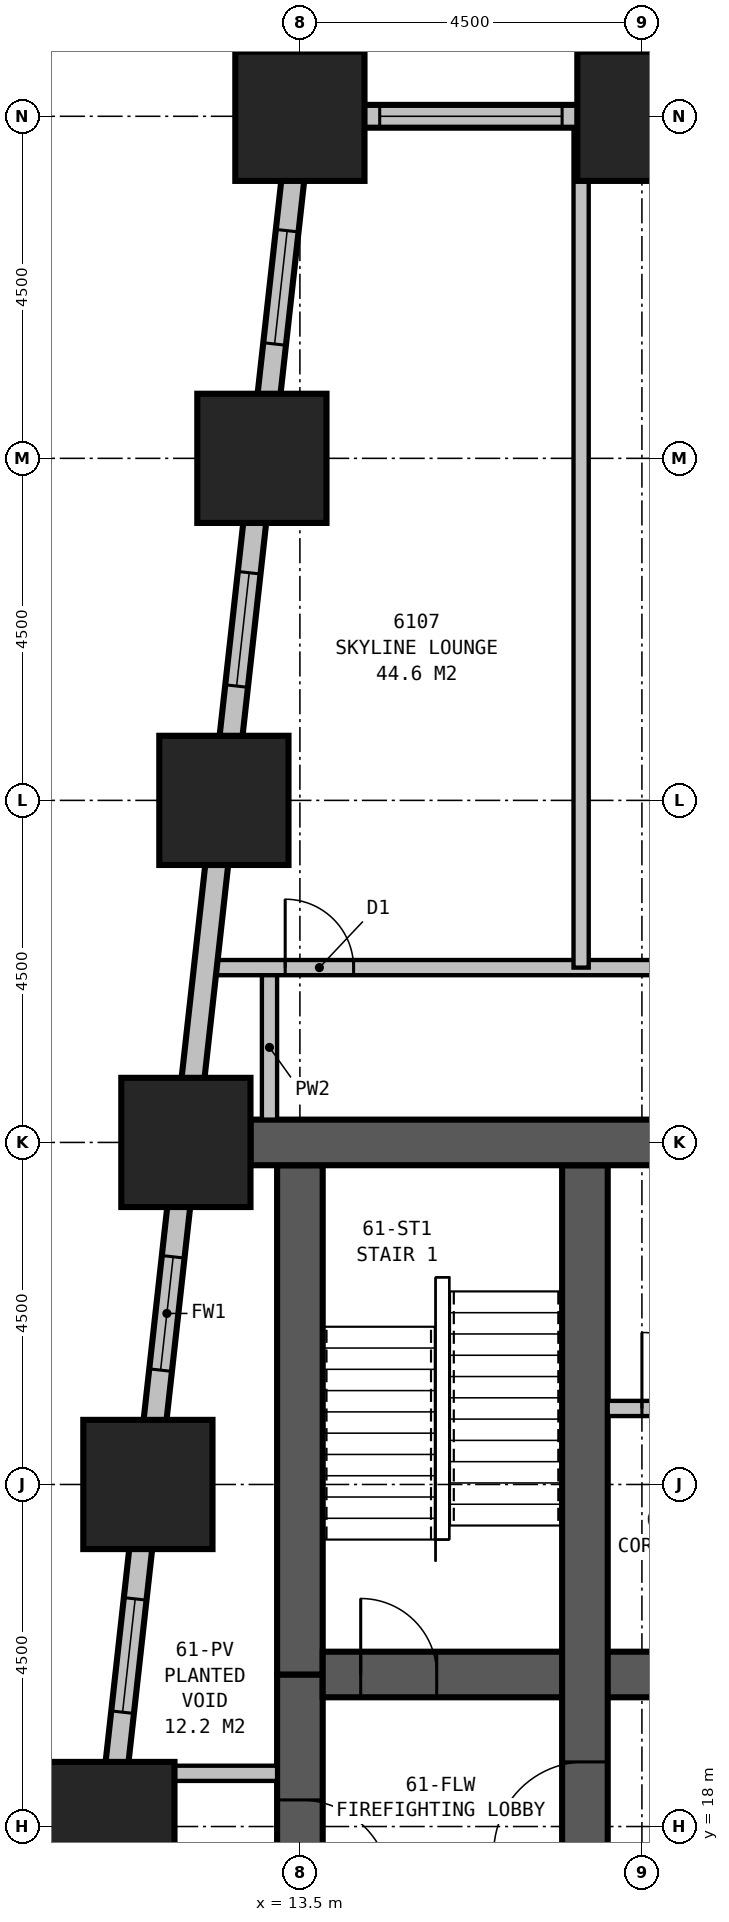
"""IFC4 building model, lengths in metres.
Left out: names, types, materials, properties, quantities, classifications, styles, units other than length and angle.
Written with IfcOpenShell. Run it as: python <this file> out.ifc"""

import sys

from ifc_helpers import new_model, si_unit, direction, frame, frame_2d, origin, origin_2d, place, context, subcontext, project, spatial, rectangle, extrude, element, fill, save


model = new_model("IFC4")
c1 = context("Model", 3, precision=1e-05, world=origin(), true_north=direction((0.0, 1.0)))
c2 = subcontext(c1, "Body", "Model", "MODEL_VIEW")
j1 = project(units=[si_unit("LENGTHUNIT", "METRE"), si_unit("PLANEANGLEUNIT", "RADIAN")], contexts=[c1])
p1 = place(None, origin())
s1 = spatial("IfcSite", under=j1, at=p1, CompositionType="ELEMENT")
p2 = place(p1, origin())
s2 = spatial("IfcBuilding", under=s1, at=p2, CompositionType="ELEMENT")
p3 = place(p2, frame((0.0, 0.0, 236.9)))
s3 = spatial("IfcBuildingStorey", under=s2, at=p3, CompositionType="ELEMENT", Elevation=236.9)
for number, where, z_axis, x_axis in (
    (1, (18.0, 40.5, 0.0), (0.0, 0.0, 1.0), (1.0, 0.0, 0.0)),
    (2, (13.5, 40.5, 0.0), (0.0, 0.0, 1.0), (1.0, 0.0, 0.0)),
    (3, (13.0, 36.0, 0.0), (0.0, 0.0, 1.0), (1.0, 0.0, 0.0)),
    (4, (12.5, 31.5, 0.0), (0.0, 0.0, 1.0), (1.0, 0.0, 0.0)),
    (5, (12.0, 27.0, 0.0), (0.0, 0.0, 1.0), (1.0, 0.0, 0.0)),
    (6, (11.5, 22.5, 0.0), (0.0, 0.0, 1.0), (1.0, 0.0, 0.0)),
    (7, (11.0, 18.0, 0.0), (0.0, 0.0, 1.0), (1.0, 0.0, 0.0)),
):
    element("IfcColumn", number, at=place(p3, frame(where, z_axis=z_axis, x_axis=x_axis)), inside=s3, PredefinedType="COLUMN", context=c2, shape_type="SweptSolid", body=[
        extrude(rectangle(XDim=1.7, YDim=1.7, at=origin_2d()), origin(), (0.0, 0.0, 1.0), 3.9),
    ])
p4 = place(p3, frame((36.3, 27.0, 0.0), z_axis=(0.0, 0.0, 1.0), x_axis=(-1.0, 0.0, 0.0)))
e8 = element("IfcWall", 8, at=p4, inside=s3, PredefinedType="SHEAR", context=c2, shape_type="SweptSolid", body=[
    extrude(rectangle(XDim=23.45, YDim=0.6, at=frame_2d((11.725, 0.0))), origin(), (0.0, 0.0, 1.0), 3.9),
])
p5 = place(p4, frame((17.05, 0.0, 0.0)))
e9 = element("IfcOpeningElement", 9, at=p5, cuts=e8, PredefinedType="OPENING", context=c2, shape_type="SweptSolid", body=[
    extrude(rectangle(XDim=1.0, YDim=2.1, at=frame_2d((0.5, 1.05))), frame((0.0, 0.31, 0.0), z_axis=(0.0, -1.0, 0.0), x_axis=(1.0, 0.0, 0.0)), (0.0, 0.0, 1.0), 0.62),
])
p6 = place(p4, frame((12.05, 0.0, 0.0)))
e10 = element("IfcOpeningElement", 10, at=p6, cuts=e8, PredefinedType="OPENING", context=c2, shape_type="SweptSolid", body=[
    extrude(rectangle(XDim=1.0, YDim=2.1, at=frame_2d((0.5, 1.05))), frame((0.0, 0.31, 0.0), z_axis=(0.0, -1.0, 0.0), x_axis=(1.0, 0.0, 0.0)), (0.0, 0.0, 1.0), 0.62),
])
p7 = place(p4, frame((7.05, 0.0, 0.0)))
e11 = element("IfcOpeningElement", 11, at=p7, cuts=e8, PredefinedType="OPENING", context=c2, shape_type="SweptSolid", body=[
    extrude(rectangle(XDim=1.0, YDim=2.1, at=frame_2d((0.5, 1.05))), frame((0.0, 0.31, 0.0), z_axis=(0.0, -1.0, 0.0), x_axis=(1.0, 0.0, 0.0)), (0.0, 0.0, 1.0), 0.62),
])
p8 = place(p3, frame((17.25, 13.8, 0.0), z_axis=(0.0, 0.0, 1.0), x_axis=(0.0, 1.0, 0.0)))
e12 = element("IfcWall", 12, at=p8, inside=s3, PredefinedType="SHEAR", context=c2, shape_type="SweptSolid", body=[
    extrude(rectangle(XDim=12.9, YDim=0.6, at=frame_2d((6.45, 0.0))), origin(), (0.0, 0.0, 1.0), 3.9),
])
p9 = place(p8, frame((3.85, 0.0, 0.0)))
e13 = element("IfcOpeningElement", 13, at=p9, cuts=e12, PredefinedType="OPENING", context=c2, shape_type="SweptSolid", body=[
    extrude(rectangle(XDim=1.2, YDim=2.1, at=frame_2d((0.6, 1.05))), frame((0.0, 0.31, 0.0), z_axis=(0.0, -1.0, 0.0), x_axis=(1.0, 0.0, 0.0)), (0.0, 0.0, 1.0), 0.62),
])
p10 = place(p3, frame((13.8, 20.0, 0.0), z_axis=(0.0, 0.0, 1.0), x_axis=(1.0, 0.0, 0.0)))
e14 = element("IfcWall", 14, at=p10, inside=s3, PredefinedType="SHEAR", context=c2, shape_type="SweptSolid", body=[
    extrude(rectangle(XDim=21.9, YDim=0.6, at=frame_2d((10.95, 0.0))), origin(), (0.0, 0.0, 1.0), 3.9),
])
p11 = place(p10, frame((0.5, 0.0, 0.0)))
e15 = element("IfcOpeningElement", 15, at=p11, cuts=e14, PredefinedType="OPENING", context=c2, shape_type="SweptSolid", body=[
    extrude(rectangle(XDim=1.0, YDim=2.1, at=frame_2d((0.5, 1.05))), frame((0.0, 0.31, 0.0), z_axis=(0.0, -1.0, 0.0), x_axis=(1.0, 0.0, 0.0)), (0.0, 0.0, 1.0), 0.62),
])
p12 = place(p10, frame((20.5, 0.0, 0.0)))
e16 = element("IfcOpeningElement", 16, at=p12, cuts=e14, PredefinedType="OPENING", context=c2, shape_type="SweptSolid", body=[
    extrude(rectangle(XDim=1.0, YDim=2.1, at=frame_2d((0.5, 1.05))), frame((0.0, 0.31, 0.0), z_axis=(0.0, -1.0, 0.0), x_axis=(1.0, 0.0, 0.0)), (0.0, 0.0, 1.0), 0.62),
])
p13 = place(p10, frame((9.15, 0.0, 0.0)))
e17 = element("IfcOpeningElement", 17, at=p13, cuts=e14, PredefinedType="OPENING", context=c2, shape_type="SweptSolid", body=[
    extrude(rectangle(XDim=1.1, YDim=2.1, at=frame_2d((0.55, 1.05))), frame((0.0, 0.31, 0.0), z_axis=(0.0, -1.0, 0.0), x_axis=(1.0, 0.0, 0.0)), (0.0, 0.0, 1.0), 0.62),
])
p14 = place(p10, frame((11.65, 0.0, 0.0)))
e18 = element("IfcOpeningElement", 18, at=p14, cuts=e14, PredefinedType="OPENING", context=c2, shape_type="SweptSolid", body=[
    extrude(rectangle(XDim=1.1, YDim=2.1, at=frame_2d((0.55, 1.05))), frame((0.0, 0.31, 0.0), z_axis=(0.0, -1.0, 0.0), x_axis=(1.0, 0.0, 0.0)), (0.0, 0.0, 1.0), 0.62),
])
p15 = place(p10, frame((14.15, 0.0, 0.0)))
e19 = element("IfcOpeningElement", 19, at=p15, cuts=e14, PredefinedType="OPENING", context=c2, shape_type="SweptSolid", body=[
    extrude(rectangle(XDim=1.1, YDim=2.1, at=frame_2d((0.55, 1.05))), frame((0.0, 0.31, 0.0), z_axis=(0.0, -1.0, 0.0), x_axis=(1.0, 0.0, 0.0)), (0.0, 0.0, 1.0), 0.62),
])
p16 = place(p10, frame((16.65, 0.0, 0.0)))
e20 = element("IfcOpeningElement", 20, at=p16, cuts=e14, PredefinedType="OPENING", context=c2, shape_type="SweptSolid", body=[
    extrude(rectangle(XDim=1.1, YDim=2.1, at=frame_2d((0.55, 1.05))), frame((0.0, 0.31, 0.0), z_axis=(0.0, -1.0, 0.0), x_axis=(1.0, 0.0, 0.0)), (0.0, 0.0, 1.0), 0.62),
])
p17 = place(p10, frame((5.75, 0.0, 0.0), z_axis=(0.0, 0.0, 1.0), x_axis=(-1.0, 0.0, 0.0)))
e21 = element("IfcOpeningElement", 21, at=p17, cuts=e14, PredefinedType="OPENING", context=c2, shape_type="SweptSolid", body=[
    extrude(rectangle(XDim=1.0, YDim=2.1, at=frame_2d((0.5, 1.05))), frame((0.0, 0.31, 0.0), z_axis=(0.0, -1.0, 0.0), x_axis=(1.0, 0.0, 0.0)), (0.0, 0.0, 1.0), 0.62),
])
p18 = place(p10, frame((6.7, 0.0, 0.0)))
e22 = element("IfcOpeningElement", 22, at=p18, cuts=e14, PredefinedType="OPENING", context=c2, shape_type="SweptSolid", body=[
    extrude(rectangle(XDim=1.0, YDim=2.1, at=frame_2d((0.5, 1.05))), frame((0.0, 0.31, 0.0), z_axis=(0.0, -1.0, 0.0), x_axis=(1.0, 0.0, 0.0)), (0.0, 0.0, 1.0), 0.62),
])
p19 = place(p3, frame((13.5, 26.7, 0.0), z_axis=(0.0, 0.0, 1.0), x_axis=(0.0, -1.0, 0.0)))
e23 = element("IfcWall", 23, at=p19, inside=s3, PredefinedType="SHEAR", context=c2, shape_type="SweptSolid", body=[
    extrude(rectangle(XDim=6.7, YDim=0.6, at=frame_2d((3.35, 0.0))), origin(), (0.0, 0.0, 1.0), 3.9),
])
p20 = place(p3, frame((13.5, 20.0, 0.0), z_axis=(0.0, 0.0, 1.0), x_axis=(0.0, -1.0, 0.0)))
e24 = element("IfcWall", 24, at=p20, inside=s3, PredefinedType="SHEAR", context=c2, shape_type="SweptSolid", body=[
    extrude(rectangle(XDim=3.5, YDim=0.6, at=frame_2d((1.75, 0.0))), origin(), (0.0, 0.0, 1.0), 3.9),
])
p21 = place(p20, frame((1.65, 0.0, 0.0)))
e25 = element("IfcOpeningElement", 25, at=p21, cuts=e24, PredefinedType="OPENING", context=c2, shape_type="SweptSolid", body=[
    extrude(rectangle(XDim=1.2, YDim=2.1, at=frame_2d((0.6, 1.05))), frame((0.0, 0.31, 0.0), z_axis=(0.0, -1.0, 0.0), x_axis=(1.0, 0.0, 0.0)), (0.0, 0.0, 1.0), 0.62),
])
p22 = place(p3, frame((40.65, 40.5, 0.0), z_axis=(0.0, 0.0, 1.0), x_axis=(-1.0, 0.0, 0.0)))
e26 = element("IfcWall", 26, at=p22, inside=s3, PredefinedType="STANDARD", context=c2, shape_type="SweptSolid", body=[
    extrude(rectangle(XDim=27.3, YDim=0.3, at=frame_2d((13.65, 0.0))), origin(), (0.0, 0.0, 1.0), 2.5),
])
p23 = place(p22, frame((1.2, 0.0, 0.5)))
e27 = element("IfcOpeningElement", 27, at=p23, cuts=e26, PredefinedType="OPENING", context=c2, shape_type="SweptSolid", body=[
    extrude(rectangle(XDim=2.4, YDim=1.85, at=frame_2d((1.2, 0.925))), frame((0.0, 0.16, 0.0), z_axis=(0.0, -1.0, 0.0), x_axis=(1.0, 0.0, 0.0)), (0.0, 0.0, 1.0), 0.32),
])
p24 = place(p22, frame((5.7, 0.0, 0.5)))
e28 = element("IfcOpeningElement", 28, at=p24, cuts=e26, PredefinedType="OPENING", context=c2, shape_type="SweptSolid", body=[
    extrude(rectangle(XDim=2.4, YDim=1.85, at=frame_2d((1.2, 0.925))), frame((0.0, 0.16, 0.0), z_axis=(0.0, -1.0, 0.0), x_axis=(1.0, 0.0, 0.0)), (0.0, 0.0, 1.0), 0.32),
])
p25 = place(p22, frame((10.2, 0.0, 0.5)))
e29 = element("IfcOpeningElement", 29, at=p25, cuts=e26, PredefinedType="OPENING", context=c2, shape_type="SweptSolid", body=[
    extrude(rectangle(XDim=2.4, YDim=1.85, at=frame_2d((1.2, 0.925))), frame((0.0, 0.16, 0.0), z_axis=(0.0, -1.0, 0.0), x_axis=(1.0, 0.0, 0.0)), (0.0, 0.0, 1.0), 0.32),
])
p26 = place(p22, frame((14.7, 0.0, 0.5)))
e30 = element("IfcOpeningElement", 30, at=p26, cuts=e26, PredefinedType="OPENING", context=c2, shape_type="SweptSolid", body=[
    extrude(rectangle(XDim=2.4, YDim=1.85, at=frame_2d((1.2, 0.925))), frame((0.0, 0.16, 0.0), z_axis=(0.0, -1.0, 0.0), x_axis=(1.0, 0.0, 0.0)), (0.0, 0.0, 1.0), 0.32),
])
p27 = place(p22, frame((19.2, 0.0, 0.5)))
e31 = element("IfcOpeningElement", 31, at=p27, cuts=e26, PredefinedType="OPENING", context=c2, shape_type="SweptSolid", body=[
    extrude(rectangle(XDim=2.4, YDim=1.85, at=frame_2d((1.2, 0.925))), frame((0.0, 0.16, 0.0), z_axis=(0.0, -1.0, 0.0), x_axis=(1.0, 0.0, 0.0)), (0.0, 0.0, 1.0), 0.32),
])
p28 = place(p22, frame((23.7, 0.0, 0.5)))
e32 = element("IfcOpeningElement", 32, at=p28, cuts=e26, PredefinedType="OPENING", context=c2, shape_type="SweptSolid", body=[
    extrude(rectangle(XDim=2.4, YDim=1.85, at=frame_2d((1.2, 0.925))), frame((0.0, 0.16, 0.0), z_axis=(0.0, -1.0, 0.0), x_axis=(1.0, 0.0, 0.0)), (0.0, 0.0, 1.0), 0.32),
])
p29 = place(p3, frame((13.517, 40.649, 0.0), z_axis=(0.0, 0.0, 1.0), x_axis=(-0.110433201132, -0.993883548555, 0.0)))
e33 = element("IfcWall", 33, at=p29, inside=s3, PredefinedType="STANDARD", context=c2, shape_type="SweptSolid", body=[
    extrude(rectangle(XDim=31.994, YDim=0.3, at=frame_2d((15.997, 0.0))), origin(), (0.0, 0.0, 1.0), 2.5),
])
p30 = place(p29, frame((1.664, 0.0, 0.5)))
e34 = element("IfcOpeningElement", 34, at=p30, cuts=e33, PredefinedType="OPENING", context=c2, shape_type="SweptSolid", body=[
    extrude(rectangle(XDim=1.5, YDim=1.85, at=frame_2d((0.75, 0.925))), frame((0.0, 0.16, 0.0), z_axis=(0.0, -1.0, 0.0), x_axis=(1.0, 0.0, 0.0)), (0.0, 0.0, 1.0), 0.32),
])
p31 = place(p29, frame((6.192, 0.0, 0.5)))
e35 = element("IfcOpeningElement", 35, at=p31, cuts=e33, PredefinedType="OPENING", context=c2, shape_type="SweptSolid", body=[
    extrude(rectangle(XDim=1.5, YDim=1.85, at=frame_2d((0.75, 0.925))), frame((0.0, 0.16, 0.0), z_axis=(0.0, -1.0, 0.0), x_axis=(1.0, 0.0, 0.0)), (0.0, 0.0, 1.0), 0.32),
])
p32 = place(p29, frame((15.247, 0.0, 0.5)))
e36 = element("IfcOpeningElement", 36, at=p32, cuts=e33, PredefinedType="OPENING", context=c2, shape_type="SweptSolid", body=[
    extrude(rectangle(XDim=1.5, YDim=1.85, at=frame_2d((0.75, 0.925))), frame((0.0, 0.16, 0.0), z_axis=(0.0, -1.0, 0.0), x_axis=(1.0, 0.0, 0.0)), (0.0, 0.0, 1.0), 0.32),
])
p33 = place(p29, frame((19.775, 0.0, 0.5)))
e37 = element("IfcOpeningElement", 37, at=p33, cuts=e33, PredefinedType="OPENING", context=c2, shape_type="SweptSolid", body=[
    extrude(rectangle(XDim=1.5, YDim=1.85, at=frame_2d((0.75, 0.925))), frame((0.0, 0.16, 0.0), z_axis=(0.0, -1.0, 0.0), x_axis=(1.0, 0.0, 0.0)), (0.0, 0.0, 1.0), 0.32),
])
p34 = place(p29, frame((24.302, 0.0, 0.5)))
e38 = element("IfcOpeningElement", 38, at=p34, cuts=e33, PredefinedType="OPENING", context=c2, shape_type="SweptSolid", body=[
    extrude(rectangle(XDim=1.5, YDim=1.85, at=frame_2d((0.75, 0.925))), frame((0.0, 0.16, 0.0), z_axis=(0.0, -1.0, 0.0), x_axis=(1.0, 0.0, 0.0)), (0.0, 0.0, 1.0), 0.32),
])
p35 = place(p29, frame((28.83, 0.0, 0.5)))
e39 = element("IfcOpeningElement", 39, at=p35, cuts=e33, PredefinedType="OPENING", context=c2, shape_type="SweptSolid", body=[
    extrude(rectangle(XDim=1.5, YDim=1.85, at=frame_2d((0.75, 0.925))), frame((0.0, 0.16, 0.0), z_axis=(0.0, -1.0, 0.0), x_axis=(1.0, 0.0, 0.0)), (0.0, 0.0, 1.0), 0.32),
])
p36 = place(p3, frame((12.406, 29.3, 0.0), z_axis=(0.0, 0.0, 1.0), x_axis=(1.0, 0.0, 0.0)))
e40 = element("IfcWall", 40, at=p36, inside=s3, PredefinedType="PARTITIONING", context=c2, shape_type="SweptSolid", body=[
    extrude(rectangle(XDim=25.894, YDim=0.2, at=frame_2d((12.947, 0.0))), origin(), (0.0, 0.0, 1.0), 3.65),
])
p37 = place(p36, frame((0.9, 0.0, 0.0)))
e41 = element("IfcOpeningElement", 41, at=p37, cuts=e40, PredefinedType="OPENING", context=c2, shape_type="SweptSolid", body=[
    extrude(rectangle(XDim=0.9, YDim=2.1, at=frame_2d((0.45, 1.05))), frame((0.0, 0.11, 0.0), z_axis=(0.0, -1.0, 0.0), x_axis=(1.0, 0.0, 0.0)), (0.0, 0.0, 1.0), 0.22),
])
p38 = place(p36, frame((6.444, 0.0, 0.0)))
e42 = element("IfcOpeningElement", 42, at=p38, cuts=e40, PredefinedType="OPENING", context=c2, shape_type="SweptSolid", body=[
    extrude(rectangle(XDim=0.9, YDim=2.1, at=frame_2d((0.45, 1.05))), frame((0.0, 0.11, 0.0), z_axis=(0.0, -1.0, 0.0), x_axis=(1.0, 0.0, 0.0)), (0.0, 0.0, 1.0), 0.22),
])
p39 = place(p36, frame((14.644, 0.0, 0.0)))
e43 = element("IfcOpeningElement", 43, at=p39, cuts=e40, PredefinedType="OPENING", context=c2, shape_type="SweptSolid", body=[
    extrude(rectangle(XDim=0.9, YDim=2.1, at=frame_2d((0.45, 1.05))), frame((0.0, 0.11, 0.0), z_axis=(0.0, -1.0, 0.0), x_axis=(1.0, 0.0, 0.0)), (0.0, 0.0, 1.0), 0.22),
])
p40 = place(p36, frame((24.293, 0.0, 0.0)))
e44 = element("IfcOpeningElement", 44, at=p40, cuts=e40, PredefinedType="OPENING", context=c2, shape_type="SweptSolid", body=[
    extrude(rectangle(XDim=0.9, YDim=2.1, at=frame_2d((0.45, 1.05))), frame((0.0, 0.11, 0.0), z_axis=(0.0, -1.0, 0.0), x_axis=(1.0, 0.0, 0.0)), (0.0, 0.0, 1.0), 0.22),
])
p41 = place(p3, frame((13.2, 18.7, 0.0), z_axis=(0.0, 0.0, 1.0), x_axis=(-1.0, 0.0, 0.0)))
e45 = element("IfcWall", 45, at=p41, inside=s3, PredefinedType="PARTITIONING", context=c2, shape_type="SweptSolid", body=[
    extrude(rectangle(XDim=1.35, YDim=0.2, at=frame_2d((0.675, 0.0))), origin(), (0.0, 0.0, 1.0), 3.65),
])
p42 = place(p3, frame((13.1, 27.3, 0.0), z_axis=(0.0, 0.0, 1.0), x_axis=(0.0, 1.0, 0.0)))
e46 = element("IfcWall", 46, at=p42, inside=s3, PredefinedType="PARTITIONING", context=c2, shape_type="SweptSolid", body=[
    extrude(rectangle(XDim=1.9, YDim=0.2, at=frame_2d((0.95, 0.0))), origin(), (0.0, 0.0, 1.0), 2.5),
])
p43 = place(p3, frame((17.2, 29.3, 0.0), z_axis=(0.0, 0.0, 1.0), x_axis=(0.0, 1.0, 0.0)))
e47 = element("IfcWall", 47, at=p43, inside=s3, PredefinedType="PARTITIONING", context=c2, shape_type="SweptSolid", body=[
    extrude(rectangle(XDim=11.2, YDim=0.2, at=frame_2d((5.6, 0.0))), origin(), (0.0, 0.0, 1.0), 2.65),
])
p44 = place(p3, frame((17.55, 23.5, 0.0), z_axis=(0.0, 0.0, 1.0), x_axis=(1.0, 0.0, 0.0)))
e48 = element("IfcWall", 48, at=p44, inside=s3, PredefinedType="PARTITIONING", context=c2, shape_type="SweptSolid", body=[
    extrude(rectangle(XDim=14.4, YDim=0.2, at=frame_2d((7.2, 0.0))), origin(), (0.0, 0.0, 1.0), 3.65),
])
p45 = place(p44, frame((0.45, 0.0, 0.0)))
e49 = element("IfcOpeningElement", 49, at=p45, cuts=e48, PredefinedType="OPENING", context=c2, shape_type="SweptSolid", body=[
    extrude(rectangle(XDim=1.0, YDim=2.1, at=frame_2d((0.5, 1.05))), frame((0.0, 0.11, 0.0), z_axis=(0.0, -1.0, 0.0), x_axis=(1.0, 0.0, 0.0)), (0.0, 0.0, 1.0), 0.22),
])
p46 = place(p28, origin())
e50 = element("IfcWindow", 50, at=p46, inside=s3, PartitioningType="SINGLE_PANEL", PredefinedType="WINDOW", context=c2, shape_type="SweptSolid", body=[
    extrude(rectangle(XDim=2.4, YDim=1.85, at=frame_2d((1.2, 0.925))), frame((0.0, 0.03, 0.0), z_axis=(0.0, -1.0, 0.0), x_axis=(1.0, 0.0, 0.0)), (0.0, 0.0, 1.0), 0.06),
])
fill(e32, e50)
p47 = place(p30, origin())
e51 = element("IfcWindow", 51, at=p47, inside=s3, PartitioningType="SINGLE_PANEL", PredefinedType="WINDOW", context=c2, shape_type="SweptSolid", body=[
    extrude(rectangle(XDim=1.5, YDim=1.85, at=frame_2d((0.75, 0.925))), frame((0.0, 0.03, 0.0), z_axis=(0.0, -1.0, 0.0), x_axis=(1.0, 0.0, 0.0)), (0.0, 0.0, 1.0), 0.06),
])
fill(e34, e51)
p48 = place(p31, origin())
e52 = element("IfcWindow", 52, at=p48, inside=s3, PartitioningType="SINGLE_PANEL", PredefinedType="WINDOW", context=c2, shape_type="SweptSolid", body=[
    extrude(rectangle(XDim=1.5, YDim=1.85, at=frame_2d((0.75, 0.925))), frame((0.0, 0.03, 0.0), z_axis=(0.0, -1.0, 0.0), x_axis=(1.0, 0.0, 0.0)), (0.0, 0.0, 1.0), 0.06),
])
fill(e35, e52)
p49 = place(p32, origin())
e53 = element("IfcWindow", 53, at=p49, inside=s3, PartitioningType="SINGLE_PANEL", PredefinedType="WINDOW", context=c2, shape_type="SweptSolid", body=[
    extrude(rectangle(XDim=1.5, YDim=1.85, at=frame_2d((0.75, 0.925))), frame((0.0, 0.03, 0.0), z_axis=(0.0, -1.0, 0.0), x_axis=(1.0, 0.0, 0.0)), (0.0, 0.0, 1.0), 0.06),
])
fill(e36, e53)
p50 = place(p33, origin())
e54 = element("IfcWindow", 54, at=p50, inside=s3, PartitioningType="SINGLE_PANEL", PredefinedType="WINDOW", context=c2, shape_type="SweptSolid", body=[
    extrude(rectangle(XDim=1.5, YDim=1.85, at=frame_2d((0.75, 0.925))), frame((0.0, 0.03, 0.0), z_axis=(0.0, -1.0, 0.0), x_axis=(1.0, 0.0, 0.0)), (0.0, 0.0, 1.0), 0.06),
])
fill(e37, e54)
p51 = place(p37, origin())
e55 = element("IfcDoor", 55, at=p51, inside=s3, OperationType="SINGLE_SWING_LEFT", PredefinedType="DOOR", context=c2, shape_type="SweptSolid", body=[
    extrude(rectangle(XDim=0.9, YDim=2.1, at=frame_2d((0.45, 1.05))), frame((0.0, 0.025, 0.0), z_axis=(0.0, -1.0, 0.0), x_axis=(1.0, 0.0, 0.0)), (0.0, 0.0, 1.0), 0.05),
])
fill(e41, e55)
p52 = place(p45, origin())
e56 = element("IfcDoor", 56, at=p52, inside=s3, OperationType="SINGLE_SWING_LEFT", PredefinedType="DOOR", context=c2, shape_type="SweptSolid", body=[
    extrude(rectangle(XDim=1.0, YDim=2.1, at=frame_2d((0.5, 1.05))), frame((0.0, 0.025, 0.0), z_axis=(0.0, -1.0, 0.0), x_axis=(1.0, 0.0, 0.0)), (0.0, 0.0, 1.0), 0.05),
])
fill(e49, e56)
p53 = place(p21, origin())
e57 = element("IfcDoor", 57, at=p53, inside=s3, OperationType="SINGLE_SWING_RIGHT", PredefinedType="DOOR", context=c2, shape_type="SweptSolid", body=[
    extrude(rectangle(XDim=1.2, YDim=2.1, at=frame_2d((0.6, 1.05))), frame((0.0, 0.3, 0.0), z_axis=(0.0, -1.0, 0.0), x_axis=(1.0, 0.0, 0.0)), (0.0, 0.0, 1.0), 0.6),
])
fill(e25, e57)
p54 = place(p9, origin())
e58 = element("IfcDoor", 58, at=p54, inside=s3, OperationType="SINGLE_SWING_LEFT", PredefinedType="DOOR", context=c2, shape_type="SweptSolid", body=[
    extrude(rectangle(XDim=1.2, YDim=2.1, at=frame_2d((0.6, 1.05))), frame((0.0, 0.3, 0.0), z_axis=(0.0, -1.0, 0.0), x_axis=(1.0, 0.0, 0.0)), (0.0, 0.0, 1.0), 0.6),
])
fill(e13, e58)
p55 = place(p11, origin())
e59 = element("IfcDoor", 59, at=p55, inside=s3, OperationType="SINGLE_SWING_LEFT", PredefinedType="DOOR", context=c2, shape_type="SweptSolid", body=[
    extrude(rectangle(XDim=1.0, YDim=2.1, at=frame_2d((0.5, 1.05))), frame((0.0, 0.3, 0.0), z_axis=(0.0, -1.0, 0.0), x_axis=(1.0, 0.0, 0.0)), (0.0, 0.0, 1.0), 0.6),
])
fill(e15, e59)
save(model, sys.argv[1])
